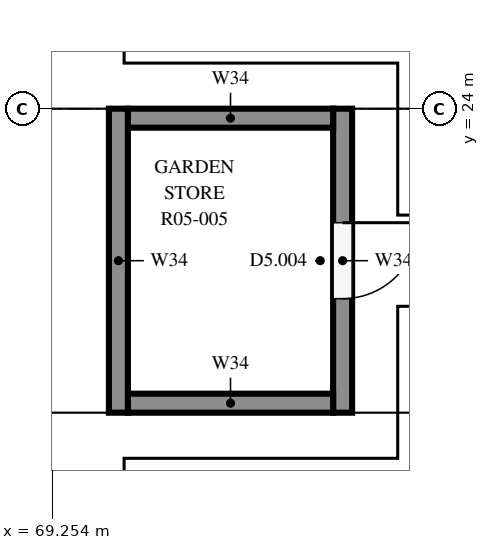
"""IFC4 building model, lengths in metres.
Left out: names, types, materials, properties, quantities, classifications, styles, units other than length and angle.
Written with IfcOpenShell. Run it as: python <this file> out.ifc"""

import sys

from ifc_helpers import new_model, si_unit, direction, frame, frame_2d, origin, place, context, subcontext, project, spatial, rectangle, extrude, element, fill, save


model = new_model("IFC4")
c1 = context("Model", 3, precision=1e-05, world=origin(), true_north=direction((0.0, 1.0)))
c2 = subcontext(c1, "Body", "Model", "MODEL_VIEW")
j1 = project(units=[si_unit("LENGTHUNIT", "METRE"), si_unit("PLANEANGLEUNIT", "RADIAN")], contexts=[c1])
p1 = place(None, origin())
s1 = spatial("IfcSite", under=j1, at=p1, CompositionType="ELEMENT")
p2 = place(p1, origin())
s2 = spatial("IfcBuilding", under=s1, at=p2, CompositionType="ELEMENT")
p3 = place(p2, frame((0.0, 0.0, 18.9)))
s3 = spatial("IfcBuildingStorey", under=s2, at=p3, CompositionType="ELEMENT", Elevation=18.9)
p4 = place(p3, frame((70.125, 20.0, 0.0), z_axis=(0.0, 0.0, 1.0), x_axis=(0.0, 1.0, 0.0)))
e1 = element("IfcWall", 1, at=p4, inside=s3, PredefinedType="SOLIDWALL", context=c2, shape_type="SweptSolid", body=[
    extrude(rectangle(XDim=4.0, YDim=0.25, at=frame_2d((2.0, 0.0))), origin(), (0.0, 0.0, 1.0), 2.6),
])
p5 = place(p3, frame((73.075, 24.0, 0.0), z_axis=(0.0, 0.0, 1.0), x_axis=(0.0, -1.0, 0.0)))
e2 = element("IfcWall", 2, at=p5, inside=s3, PredefinedType="SOLIDWALL", context=c2, shape_type="SweptSolid", body=[
    extrude(rectangle(XDim=4.0, YDim=0.25, at=frame_2d((2.0, 0.0))), origin(), (0.0, 0.0, 1.0), 2.6),
])
p6 = place(p5, frame((1.5, 0.0, 0.0)))
e3 = element("IfcOpeningElement", 3, at=p6, cuts=e2, PredefinedType="OPENING", context=c2, shape_type="SweptSolid", body=[
    extrude(rectangle(XDim=1.0, YDim=2.1, at=frame_2d((0.5, 1.05))), frame((0.0, 0.135, 0.0), z_axis=(0.0, -1.0, 0.0), x_axis=(1.0, 0.0, 0.0)), (0.0, 0.0, 1.0), 0.27),
])
for number, where, z_axis, x_axis in (
    (4, (70.25, 20.125, 0.0), (0.0, 0.0, 1.0), (1.0, 0.0, 0.0)),
    (5, (70.25, 23.875, 0.0), (0.0, 0.0, 1.0), (1.0, 0.0, 0.0)),
):
    element("IfcWall", number, at=place(p3, frame(where, z_axis=z_axis, x_axis=x_axis)), inside=s3, PredefinedType="SOLIDWALL", context=c2, shape_type="SweptSolid", body=[
        extrude(rectangle(XDim=2.7, YDim=0.25, at=frame_2d((1.35, 0.0))), origin(), (0.0, 0.0, 1.0), 2.6),
    ])
p7 = place(p6, origin())
e6 = element("IfcDoor", 6, at=p7, inside=s3, OperationType="SINGLE_SWING_LEFT", PredefinedType="DOOR", context=c2, shape_type="SweptSolid", body=[
    extrude(rectangle(XDim=1.0, YDim=2.1, at=frame_2d((0.5, 1.05))), frame((0.0, 0.025, 0.0), z_axis=(0.0, -1.0, 0.0), x_axis=(1.0, 0.0, 0.0)), (0.0, 0.0, 1.0), 0.05),
])
fill(e3, e6)
save(model, sys.argv[1])
